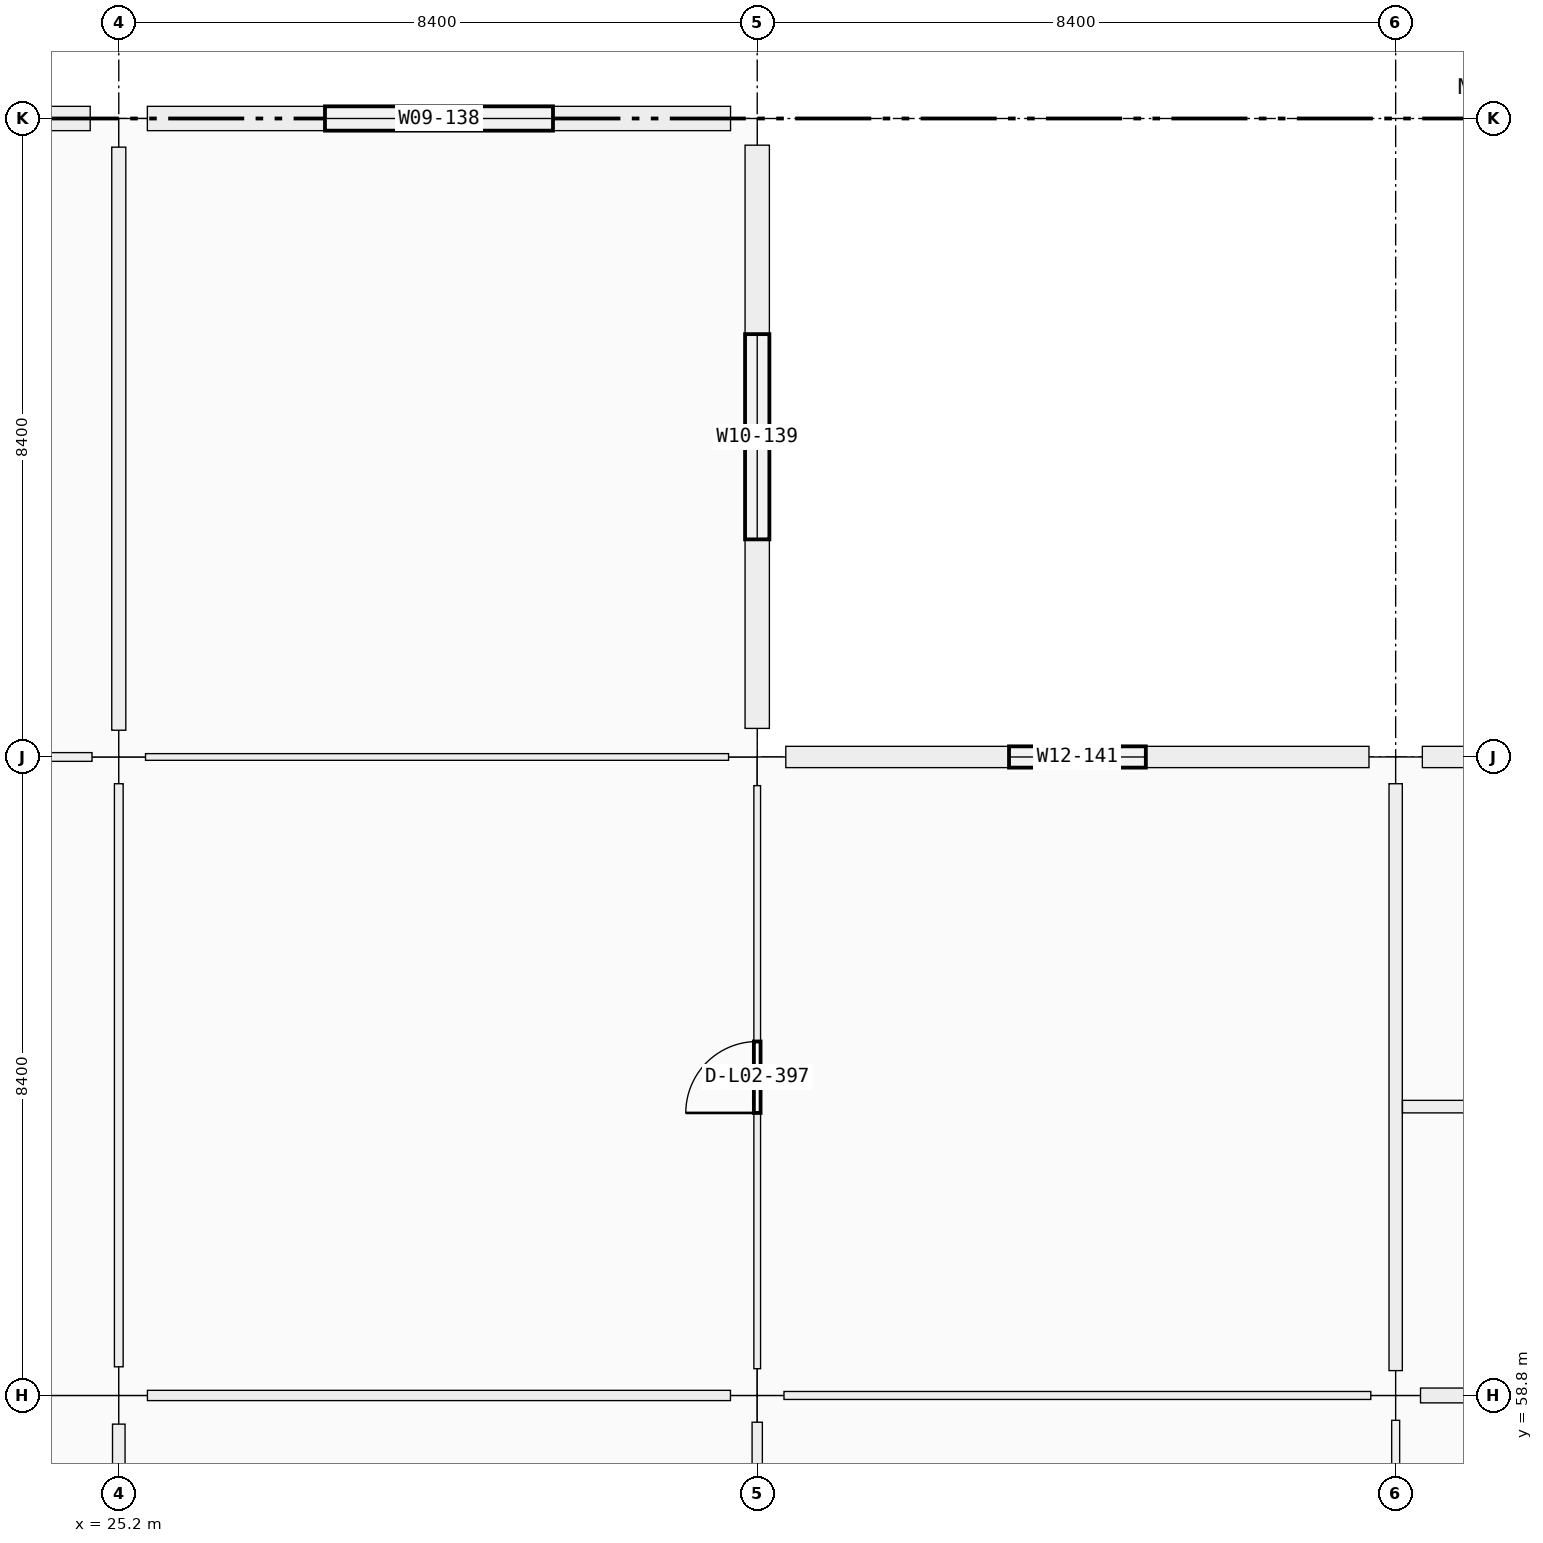
"""IFC4 building model, lengths in metres.
Left out: names, types, materials, properties, quantities, classifications, styles, units other than length and angle.
Written with IfcOpenShell. Run it as: python <this file> out.ifc"""

import sys

from ifc_helpers import new_model, si_unit, direction, frame, frame_2d, origin, origin_2d, place, context, subcontext, project, spatial, rectangle, extrude, element, fill, save


model = new_model("IFC4")
c1 = context("Model", 3, precision=1e-05, world=origin(), true_north=direction((0.0, 1.0)))
c2 = subcontext(c1, "Body", "Model", "MODEL_VIEW")
j1 = project(units=[si_unit("LENGTHUNIT", "METRE"), si_unit("PLANEANGLEUNIT", "RADIAN")], contexts=[c1])
p1 = place(None, origin())
s1 = spatial("IfcSite", under=j1, at=p1, CompositionType="ELEMENT")
p2 = place(p1, origin())
s2 = spatial("IfcBuilding", under=s1, at=p2, CompositionType="ELEMENT")
p3 = place(p2, frame((0.0, 0.0, 10.26)))
s3 = spatial("IfcBuildingStorey", under=s2, at=p3, CompositionType="ELEMENT", Elevation=10.26)
p4 = place(p3, frame((25.2, 58.8, 0.0), z_axis=(0.0, 0.0, 1.0), x_axis=(1.0, 0.0, 0.0)))
e1 = element("IfcColumn", 1, at=p4, inside=s3, PredefinedType="COLUMN", context=c2, shape_type="SweptSolid", body=[
    extrude(rectangle(XDim=0.75, YDim=0.75, at=origin_2d()), origin(), (0.0, 0.0, 1.0), 4.5),
])
p5 = place(p3, frame((25.2, 67.2, 0.0), z_axis=(0.0, 0.0, 1.0), x_axis=(1.0, 0.0, 0.0)))
e2 = element("IfcColumn", 2, at=p5, inside=s3, PredefinedType="COLUMN", context=c2, shape_type="SweptSolid", body=[
    extrude(rectangle(XDim=0.7, YDim=0.7, at=origin_2d()), origin(), (0.0, 0.0, 1.0), 4.5),
])
p6 = place(p3, frame((25.2, 75.6, 0.0), z_axis=(0.0, 0.0, 1.0), x_axis=(1.0, 0.0, 0.0)))
e3 = element("IfcColumn", 3, at=p6, inside=s3, PredefinedType="COLUMN", context=c2, shape_type="SweptSolid", body=[
    extrude(rectangle(XDim=0.75, YDim=0.75, at=origin_2d()), origin(), (0.0, 0.0, 1.0), 4.5),
])
p7 = place(p3, frame((33.6, 58.8, 0.0), z_axis=(0.0, 0.0, 1.0), x_axis=(1.0, 0.0, 0.0)))
e4 = element("IfcColumn", 4, at=p7, inside=s3, PredefinedType="COLUMN", context=c2, shape_type="SweptSolid", body=[
    extrude(rectangle(XDim=0.7, YDim=0.7, at=origin_2d()), origin(), (0.0, 0.0, 1.0), 4.5),
])
p8 = place(p3, frame((33.6, 67.2, 0.0), z_axis=(0.0, 0.0, 1.0), x_axis=(1.0, 0.0, 0.0)))
e5 = element("IfcColumn", 5, at=p8, inside=s3, PredefinedType="COLUMN", context=c2, shape_type="SweptSolid", body=[
    extrude(rectangle(XDim=0.75, YDim=0.75, at=origin_2d()), origin(), (0.0, 0.0, 1.0), 4.5),
])
p9 = place(p3, frame((33.6, 75.6, 0.0), z_axis=(0.0, 0.0, 1.0), x_axis=(1.0, 0.0, 0.0)))
e6 = element("IfcColumn", 6, at=p9, inside=s3, PredefinedType="COLUMN", context=c2, shape_type="SweptSolid", body=[
    extrude(rectangle(XDim=0.7, YDim=0.7, at=origin_2d()), origin(), (0.0, 0.0, 1.0), 4.5),
])
p10 = place(p3, frame((42.0, 58.8, 0.0), z_axis=(0.0, 0.0, 1.0), x_axis=(1.0, 0.0, 0.0)))
e7 = element("IfcColumn", 7, at=p10, inside=s3, PredefinedType="COLUMN", context=c2, shape_type="SweptSolid", body=[
    extrude(rectangle(XDim=0.65, YDim=0.65, at=origin_2d()), origin(), (0.0, 0.0, 1.0), 4.5),
])
p11 = place(p3, frame((42.0, 67.2, 0.0), z_axis=(0.0, 0.0, 1.0), x_axis=(1.0, 0.0, 0.0)))
e8 = element("IfcColumn", 8, at=p11, inside=s3, PredefinedType="COLUMN", context=c2, shape_type="SweptSolid", body=[
    extrude(rectangle(XDim=0.7, YDim=0.7, at=origin_2d()), origin(), (0.0, 0.0, 1.0), 4.5),
])
p12 = place(p3, frame((42.0, 75.6, 0.0), z_axis=(0.0, 0.0, 1.0), x_axis=(1.0, 0.0, 0.0)))
e9 = element("IfcColumn", 9, at=p12, inside=s3, PredefinedType="COLUMN", context=c2, shape_type="SweptSolid", body=[
    extrude(rectangle(XDim=0.75, YDim=0.75, at=origin_2d()), origin(), (0.0, 0.0, 1.0), 4.5),
])
p13 = place(p3, frame((17.151, 75.6, 0.0), z_axis=(0.0, 0.0, 1.0), x_axis=(1.0, 0.0, 0.0)))
e10 = element("IfcWall", 10, at=p13, inside=s3, PredefinedType="SOLIDWALL", context=c2, shape_type="SweptSolid", body=[
    extrude(rectangle(XDim=7.673, YDim=0.32, at=frame_2d((3.836, 0.0))), origin(), (0.0, 0.0, 1.0), 3.54),
])
p14 = place(p13, frame((2.636, 0.0, 0.9)))
e11 = element("IfcOpeningElement", 11, at=p14, cuts=e10, PredefinedType="OPENING", context=c2, shape_type="SweptSolid", body=[
    extrude(rectangle(XDim=2.4, YDim=1.8, at=frame_2d((1.2, 0.9))), frame((0.0, 0.16, 0.0), z_axis=(0.0, -1.0, 0.0), x_axis=(1.0, 0.0, 0.0)), (0.0, 0.0, 1.0), 0.32),
])
p15 = place(p3, frame((25.576, 75.6, 0.0), z_axis=(0.0, 0.0, 1.0), x_axis=(1.0, 0.0, 0.0)))
e12 = element("IfcWall", 12, at=p15, inside=s3, PredefinedType="SOLIDWALL", context=c2, shape_type="SweptSolid", body=[
    extrude(rectangle(XDim=7.673, YDim=0.32, at=frame_2d((3.836, 0.0))), origin(), (0.0, 0.0, 1.0), 3.54),
])
p16 = place(p15, frame((2.337, 0.0, 0.9)))
e13 = element("IfcOpeningElement", 13, at=p16, cuts=e12, PredefinedType="OPENING", context=c2, shape_type="SweptSolid", body=[
    extrude(rectangle(XDim=3.0, YDim=1.2, at=frame_2d((1.5, 0.6))), frame((0.0, 0.16, 0.0), z_axis=(0.0, -1.0, 0.0), x_axis=(1.0, 0.0, 0.0)), (0.0, 0.0, 1.0), 0.32),
])
p17 = place(p3, frame((33.6, 75.249, 0.0), z_axis=(0.0, 0.0, 1.0), x_axis=(0.0, -1.0, 0.0)))
e14 = element("IfcWall", 14, at=p17, inside=s3, PredefinedType="SOLIDWALL", context=c2, shape_type="SweptSolid", body=[
    extrude(rectangle(XDim=7.673, YDim=0.32, at=frame_2d((3.836, 0.0))), origin(), (0.0, 0.0, 1.0), 3.54),
])
p18 = place(p17, frame((2.486, 0.0, 0.9)))
e15 = element("IfcOpeningElement", 15, at=p18, cuts=e14, PredefinedType="OPENING", context=c2, shape_type="SweptSolid", body=[
    extrude(rectangle(XDim=2.7, YDim=1.2, at=frame_2d((1.35, 0.6))), frame((0.0, 0.16, 0.0), z_axis=(0.0, -1.0, 0.0), x_axis=(1.0, 0.0, 0.0)), (0.0, 0.0, 1.0), 0.32),
])
p19 = place(p3, frame((33.976, 67.2, 0.0), z_axis=(0.0, 0.0, 1.0), x_axis=(1.0, 0.0, 0.0)))
e16 = element("IfcWall", 16, at=p19, inside=s3, PredefinedType="SOLIDWALL", context=c2, shape_type="SweptSolid", body=[
    extrude(rectangle(XDim=7.673, YDim=0.28, at=frame_2d((3.836, 0.0))), origin(), (0.0, 0.0, 1.0), 3.54),
])
p20 = place(p19, frame((2.937, 0.0, 0.9)))
e17 = element("IfcOpeningElement", 17, at=p20, cuts=e16, PredefinedType="OPENING", context=c2, shape_type="SweptSolid", body=[
    extrude(rectangle(XDim=1.8, YDim=1.35, at=frame_2d((0.9, 0.675))), frame((0.0, 0.14, 0.0), z_axis=(0.0, -1.0, 0.0), x_axis=(1.0, 0.0, 0.0)), (0.0, 0.0, 1.0), 0.28),
])
p21 = place(p3, frame((42.351, 67.2, 0.0), z_axis=(0.0, 0.0, 1.0), x_axis=(1.0, 0.0, 0.0)))
e18 = element("IfcWall", 18, at=p21, inside=s3, PredefinedType="SOLIDWALL", context=c2, shape_type="SweptSolid", body=[
    extrude(rectangle(XDim=7.673, YDim=0.28, at=frame_2d((3.836, 0.0))), origin(), (0.0, 0.0, 1.0), 3.54),
])
p22 = place(p21, frame((3.136, 0.0, 0.9)))
e19 = element("IfcOpeningElement", 19, at=p22, cuts=e18, PredefinedType="OPENING", context=c2, shape_type="SweptSolid", body=[
    extrude(rectangle(XDim=1.4, YDim=1.75, at=frame_2d((0.7, 0.875))), frame((0.0, 0.14, 0.0), z_axis=(0.0, -1.0, 0.0), x_axis=(1.0, 0.0, 0.0)), (0.0, 0.0, 1.0), 0.28),
])
p23 = place(p3, frame((17.177, 67.2, 0.0), z_axis=(0.0, 0.0, 1.0), x_axis=(1.0, 0.0, 0.0)))
e20 = element("IfcWall", 20, at=p23, inside=s3, PredefinedType="PARTITIONING", context=c2, shape_type="SweptSolid", body=[
    extrude(rectangle(XDim=7.671, YDim=0.115, at=frame_2d((3.835, 0.0))), origin(), (0.0, 0.0, 1.0), 3.37),
])
p24 = place(p23, frame((3.316, 0.0, 0.0)))
e21 = element("IfcOpeningElement", 21, at=p24, cuts=e20, PredefinedType="OPENING", context=c2, shape_type="SweptSolid", body=[
    extrude(rectangle(XDim=1.04, YDim=2.2, at=frame_2d((0.52, 1.1))), frame((0.0, 0.058, 0.0), z_axis=(0.0, -1.0, 0.0), x_axis=(1.0, 0.0, 0.0)), (0.0, 0.0, 1.0), 0.115),
])
p25 = place(p3, frame((25.577, 58.8, 0.0), z_axis=(0.0, 0.0, 1.0), x_axis=(1.0, 0.0, 0.0)))
e22 = element("IfcWall", 22, at=p25, inside=s3, PredefinedType="PARTITIONING", context=c2, shape_type="SweptSolid", body=[
    extrude(rectangle(XDim=7.671, YDim=0.135, at=frame_2d((3.835, 0.0))), origin(), (0.0, 0.0, 1.0), 3.37),
])
p26 = place(p25, frame((3.306, 0.0, 0.0)))
e23 = element("IfcOpeningElement", 23, at=p26, cuts=e22, PredefinedType="OPENING", context=c2, shape_type="SweptSolid", body=[
    extrude(rectangle(XDim=1.06, YDim=2.25, at=frame_2d((0.53, 1.125))), frame((0.0, 0.067, 0.0), z_axis=(0.0, -1.0, 0.0), x_axis=(1.0, 0.0, 0.0)), (0.0, 0.0, 1.0), 0.135),
])
p27 = place(p3, frame((25.552, 67.2, 0.0), z_axis=(0.0, 0.0, 1.0), x_axis=(1.0, 0.0, 0.0)))
e24 = element("IfcWall", 24, at=p27, inside=s3, PredefinedType="PARTITIONING", context=c2, shape_type="SweptSolid", body=[
    extrude(rectangle(XDim=7.671, YDim=0.088, at=frame_2d((3.835, 0.0))), origin(), (0.0, 0.0, 1.0), 3.37),
])
p28 = place(p27, frame((3.316, 0.0, 0.0)))
e25 = element("IfcOpeningElement", 25, at=p28, cuts=e24, PredefinedType="OPENING", context=c2, shape_type="SweptSolid", body=[
    extrude(rectangle(XDim=1.04, YDim=2.2, at=frame_2d((0.52, 1.1))), frame((0.0, 0.044, 0.0), z_axis=(0.0, -1.0, 0.0), x_axis=(1.0, 0.0, 0.0)), (0.0, 0.0, 1.0), 0.088),
])
p29 = place(p3, frame((33.952, 58.8, 0.0), z_axis=(0.0, 0.0, 1.0), x_axis=(1.0, 0.0, 0.0)))
e26 = element("IfcWall", 26, at=p29, inside=s3, PredefinedType="PARTITIONING", context=c2, shape_type="SweptSolid", body=[
    extrude(rectangle(XDim=7.721, YDim=0.105, at=frame_2d((3.861, 0.0))), origin(), (0.0, 0.0, 1.0), 3.37),
])
p30 = place(p29, frame((3.351, 0.0, 0.0)))
e27 = element("IfcOpeningElement", 27, at=p30, cuts=e26, PredefinedType="OPENING", context=c2, shape_type="SweptSolid", body=[
    extrude(rectangle(XDim=1.02, YDim=2.2, at=frame_2d((0.51, 1.1))), frame((0.0, 0.052, 0.0), z_axis=(0.0, -1.0, 0.0), x_axis=(1.0, 0.0, 0.0)), (0.0, 0.0, 1.0), 0.105),
])
p31 = place(p3, frame((42.327, 58.8, 0.0), z_axis=(0.0, 0.0, 1.0), x_axis=(1.0, 0.0, 0.0)))
e28 = element("IfcWall", 28, at=p31, inside=s3, PredefinedType="PARTITIONING", context=c2, shape_type="SweptSolid", body=[
    extrude(rectangle(XDim=7.771, YDim=0.195, at=frame_2d((3.885, 0.0))), origin(), (0.0, 0.0, 1.0), 3.37),
])
p32 = place(p3, frame((25.2, 50.752, 0.0), z_axis=(0.0, 0.0, 1.0), x_axis=(0.0, 1.0, 0.0)))
e29 = element("IfcWall", 29, at=p32, inside=s3, PredefinedType="PARTITIONING", context=c2, shape_type="SweptSolid", body=[
    extrude(rectangle(XDim=7.671, YDim=0.165, at=frame_2d((3.835, 0.0))), origin(), (0.0, 0.0, 1.0), 3.37),
])
p33 = place(p32, frame((3.306, 0.0, 0.0)))
e30 = element("IfcOpeningElement", 30, at=p33, cuts=e29, PredefinedType="OPENING", context=c2, shape_type="SweptSolid", body=[
    extrude(rectangle(XDim=1.06, YDim=2.25, at=frame_2d((0.53, 1.125))), frame((0.0, 0.083, 0.0), z_axis=(0.0, -1.0, 0.0), x_axis=(1.0, 0.0, 0.0)), (0.0, 0.0, 1.0), 0.165),
])
p34 = place(p3, frame((25.2, 59.177, 0.0), z_axis=(0.0, 0.0, 1.0), x_axis=(0.0, 1.0, 0.0)))
e31 = element("IfcWall", 31, at=p34, inside=s3, PredefinedType="PARTITIONING", context=c2, shape_type="SweptSolid", body=[
    extrude(rectangle(XDim=7.671, YDim=0.115, at=frame_2d((3.835, 0.0))), origin(), (0.0, 0.0, 1.0), 3.37),
])
p35 = place(p34, frame((3.316, 0.0, 0.0)))
e32 = element("IfcOpeningElement", 32, at=p35, cuts=e31, PredefinedType="OPENING", context=c2, shape_type="SweptSolid", body=[
    extrude(rectangle(XDim=1.04, YDim=2.2, at=frame_2d((0.52, 1.1))), frame((0.0, 0.058, 0.0), z_axis=(0.0, -1.0, 0.0), x_axis=(1.0, 0.0, 0.0)), (0.0, 0.0, 1.0), 0.115),
])
p36 = place(p3, frame((25.2, 67.552, 0.0), z_axis=(0.0, 0.0, 1.0), x_axis=(0.0, 1.0, 0.0)))
e33 = element("IfcWall", 33, at=p36, inside=s3, PredefinedType="PARTITIONING", context=c2, shape_type="SweptSolid", body=[
    extrude(rectangle(XDim=7.671, YDim=0.185, at=frame_2d((3.835, 0.0))), origin(), (0.0, 0.0, 1.0), 3.37),
])
p37 = place(p36, frame((3.356, 0.0, 0.0)))
e34 = element("IfcOpeningElement", 34, at=p37, cuts=e33, PredefinedType="OPENING", context=c2, shape_type="SweptSolid", body=[
    extrude(rectangle(XDim=0.96, YDim=2.18, at=frame_2d((0.48, 1.09))), frame((0.0, 0.093, 0.0), z_axis=(0.0, -1.0, 0.0), x_axis=(1.0, 0.0, 0.0)), (0.0, 0.0, 1.0), 0.185),
])
p38 = place(p3, frame((33.6, 50.777, 0.0), z_axis=(0.0, 0.0, 1.0), x_axis=(0.0, 1.0, 0.0)))
e35 = element("IfcWall", 35, at=p38, inside=s3, PredefinedType="PARTITIONING", context=c2, shape_type="SweptSolid", body=[
    extrude(rectangle(XDim=7.671, YDim=0.135, at=frame_2d((3.835, 0.0))), origin(), (0.0, 0.0, 1.0), 3.37),
])
p39 = place(p38, frame((3.336, 0.0, 0.0)))
e36 = element("IfcOpeningElement", 36, at=p39, cuts=e35, PredefinedType="OPENING", context=c2, shape_type="SweptSolid", body=[
    extrude(rectangle(XDim=1.0, YDim=2.2, at=frame_2d((0.5, 1.1))), frame((0.0, 0.067, 0.0), z_axis=(0.0, -1.0, 0.0), x_axis=(1.0, 0.0, 0.0)), (0.0, 0.0, 1.0), 0.135),
])
p40 = place(p3, frame((33.6, 59.152, 0.0), z_axis=(0.0, 0.0, 1.0), x_axis=(0.0, 1.0, 0.0)))
e37 = element("IfcWall", 37, at=p40, inside=s3, PredefinedType="PARTITIONING", context=c2, shape_type="SweptSolid", body=[
    extrude(rectangle(XDim=7.671, YDim=0.088, at=frame_2d((3.835, 0.0))), origin(), (0.0, 0.0, 1.0), 3.37),
])
p41 = place(p40, frame((3.365, 0.0, 0.0)))
e38 = element("IfcOpeningElement", 38, at=p41, cuts=e37, PredefinedType="OPENING", context=c2, shape_type="SweptSolid", body=[
    extrude(rectangle(XDim=0.94, YDim=2.15, at=frame_2d((0.47, 1.075))), frame((0.0, 0.044, 0.0), z_axis=(0.0, -1.0, 0.0), x_axis=(1.0, 0.0, 0.0)), (0.0, 0.0, 1.0), 0.088),
])
p42 = place(p3, frame((42.0, 50.702, 0.0), z_axis=(0.0, 0.0, 1.0), x_axis=(0.0, 1.0, 0.0)))
e39 = element("IfcWall", 39, at=p42, inside=s3, PredefinedType="PARTITIONING", context=c2, shape_type="SweptSolid", body=[
    extrude(rectangle(XDim=7.771, YDim=0.105, at=frame_2d((3.885, 0.0))), origin(), (0.0, 0.0, 1.0), 3.37),
])
p43 = place(p3, frame((42.0, 59.127, 0.0), z_axis=(0.0, 0.0, 1.0), x_axis=(0.0, 1.0, 0.0)))
e40 = element("IfcWall", 40, at=p43, inside=s3, PredefinedType="PARTITIONING", context=c2, shape_type="SweptSolid", body=[
    extrude(rectangle(XDim=7.721, YDim=0.175, at=frame_2d((3.86, 0.0))), origin(), (0.0, 0.0, 1.0), 3.37),
])
p44 = place(p3, frame((42.09, 62.6, 0.0), z_axis=(0.0, 0.0, 1.0), x_axis=(1.0, 0.0, 0.0)))
e41 = element("IfcWall", 41, at=p44, inside=s3, PredefinedType="PARTITIONING", context=c2, shape_type="SweptSolid", body=[
    extrude(rectangle(XDim=8.236, YDim=0.165, at=frame_2d((4.118, 0.0))), origin(), (0.0, 0.0, 1.0), 3.37),
])
p45 = place(p16, origin())
e42 = element("IfcWindow", 42, at=p45, inside=s3, PartitioningType="SINGLE_PANEL", PredefinedType="WINDOW", context=c2, shape_type="SweptSolid", body=[
    extrude(rectangle(XDim=3.0, YDim=1.2, at=frame_2d((1.5, 0.6))), frame((0.0, 0.03, 0.0), z_axis=(0.0, -1.0, 0.0), x_axis=(1.0, 0.0, 0.0)), (0.0, 0.0, 1.0), 0.06),
])
fill(e13, e42)
p46 = place(p18, origin())
e43 = element("IfcWindow", 43, at=p46, inside=s3, PartitioningType="SINGLE_PANEL", PredefinedType="WINDOW", context=c2, shape_type="SweptSolid", body=[
    extrude(rectangle(XDim=2.7, YDim=1.2, at=frame_2d((1.35, 0.6))), frame((0.0, 0.03, 0.0), z_axis=(0.0, -1.0, 0.0), x_axis=(1.0, 0.0, 0.0)), (0.0, 0.0, 1.0), 0.06),
])
fill(e15, e43)
p47 = place(p20, origin())
e44 = element("IfcWindow", 44, at=p47, inside=s3, PartitioningType="SINGLE_PANEL", PredefinedType="WINDOW", context=c2, shape_type="SweptSolid", body=[
    extrude(rectangle(XDim=1.8, YDim=1.35, at=frame_2d((0.9, 0.675))), frame((0.0, 0.03, 0.0), z_axis=(0.0, -1.0, 0.0), x_axis=(1.0, 0.0, 0.0)), (0.0, 0.0, 1.0), 0.06),
])
fill(e17, e44)
p48 = place(p35, origin())
e45 = element("IfcDoor", 45, at=p48, inside=s3, OperationType="SINGLE_SWING_RIGHT", PredefinedType="DOOR", context=c2, shape_type="SweptSolid", body=[
    extrude(rectangle(XDim=1.04, YDim=2.2, at=frame_2d((0.52, 1.1))), frame((0.0, 0.025, 0.0), z_axis=(0.0, -1.0, 0.0), x_axis=(1.0, 0.0, 0.0)), (0.0, 0.0, 1.0), 0.05),
])
fill(e32, e45)
p49 = place(p28, origin())
e46 = element("IfcDoor", 46, at=p49, inside=s3, OperationType="SINGLE_SWING_RIGHT", PredefinedType="DOOR", context=c2, shape_type="SweptSolid", body=[
    extrude(rectangle(XDim=1.04, YDim=2.2, at=frame_2d((0.52, 1.1))), frame((0.0, 0.025, 0.0), z_axis=(0.0, -1.0, 0.0), x_axis=(1.0, 0.0, 0.0)), (0.0, 0.0, 1.0), 0.05),
])
fill(e25, e46)
p50 = place(p30, origin())
e47 = element("IfcDoor", 47, at=p50, inside=s3, OperationType="SINGLE_SWING_LEFT", PredefinedType="DOOR", context=c2, shape_type="SweptSolid", body=[
    extrude(rectangle(XDim=1.02, YDim=2.2, at=frame_2d((0.51, 1.1))), frame((0.0, 0.025, 0.0), z_axis=(0.0, -1.0, 0.0), x_axis=(1.0, 0.0, 0.0)), (0.0, 0.0, 1.0), 0.05),
])
fill(e27, e47)
p51 = place(p26, origin())
e48 = element("IfcDoor", 48, at=p51, inside=s3, OperationType="SINGLE_SWING_LEFT", PredefinedType="DOOR", context=c2, shape_type="SweptSolid", body=[
    extrude(rectangle(XDim=1.06, YDim=2.25, at=frame_2d((0.53, 1.125))), frame((0.0, 0.025, 0.0), z_axis=(0.0, -1.0, 0.0), x_axis=(1.0, 0.0, 0.0)), (0.0, 0.0, 1.0), 0.05),
])
fill(e23, e48)
p52 = place(p37, origin())
e49 = element("IfcDoor", 49, at=p52, inside=s3, OperationType="SINGLE_SWING_RIGHT", PredefinedType="DOOR", context=c2, shape_type="SweptSolid", body=[
    extrude(rectangle(XDim=0.96, YDim=2.18, at=frame_2d((0.48, 1.09))), frame((0.0, 0.025, 0.0), z_axis=(0.0, -1.0, 0.0), x_axis=(1.0, 0.0, 0.0)), (0.0, 0.0, 1.0), 0.05),
])
fill(e34, e49)
p53 = place(p41, origin())
e50 = element("IfcDoor", 50, at=p53, inside=s3, OperationType="SINGLE_SWING_LEFT", PredefinedType="DOOR", context=c2, shape_type="SweptSolid", body=[
    extrude(rectangle(XDim=0.94, YDim=2.15, at=frame_2d((0.47, 1.075))), frame((0.0, 0.025, 0.0), z_axis=(0.0, -1.0, 0.0), x_axis=(1.0, 0.0, 0.0)), (0.0, 0.0, 1.0), 0.05),
])
fill(e38, e50)
save(model, sys.argv[1])
